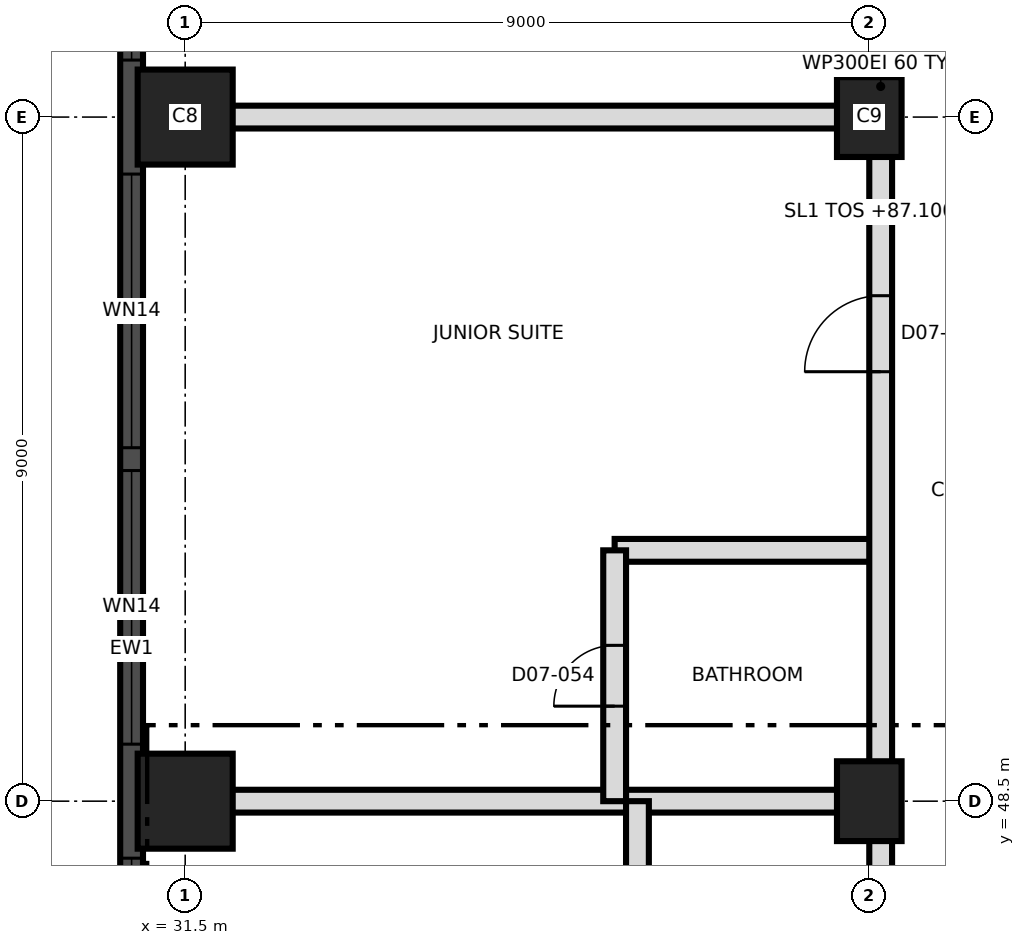
"""IFC4 building model, lengths in metres.
Left out: names, types, materials, properties, quantities, classifications, styles, units other than length and angle.
Written with IfcOpenShell. Run it as: python <this file> out.ifc"""

import sys

from ifc_helpers import new_model, si_unit, direction, frame, frame_2d, origin, origin_2d, place, context, subcontext, project, spatial, rectangle, extrude, element, fill, save


model = new_model("IFC4")
c1 = context("Model", 3, precision=1e-05, world=origin(), true_north=direction((0.0, 1.0)))
c2 = subcontext(c1, "Body", "Model", "MODEL_VIEW")
j1 = project(units=[si_unit("LENGTHUNIT", "METRE"), si_unit("PLANEANGLEUNIT", "RADIAN")], contexts=[c1])
p1 = place(None, origin())
s1 = spatial("IfcSite", under=j1, at=p1, CompositionType="ELEMENT")
p2 = place(p1, origin())
s2 = spatial("IfcBuilding", under=s1, at=p2, CompositionType="ELEMENT")
p3 = place(p2, frame((0.0, 0.0, 87.1)))
s3 = spatial("IfcBuildingStorey", under=s2, at=p3, CompositionType="ELEMENT", Elevation=87.1)
p4 = place(p3, frame((31.5, 48.5, 0.0), z_axis=(0.0, 0.0, 1.0), x_axis=(1.0, 0.0, 0.0)))
e1 = element("IfcColumn", 1, at=p4, inside=s3, PredefinedType="COLUMN", context=c2, shape_type="SweptSolid", body=[
    extrude(rectangle(XDim=1.25, YDim=1.25, at=origin_2d()), origin(), (0.0, 0.0, 1.0), 3.7),
])
p5 = place(p3, frame((40.5, 48.5, 0.0), z_axis=(0.0, 0.0, 1.0), x_axis=(0.0, 1.0, 0.0)))
e2 = element("IfcColumn", 2, at=p5, inside=s3, PredefinedType="COLUMN", context=c2, shape_type="SweptSolid", body=[
    extrude(rectangle(XDim=1.05, YDim=0.85, at=origin_2d()), origin(), (0.0, 0.0, 1.0), 3.7),
])
p6 = place(p3, frame((31.5, 57.5, 0.0), z_axis=(0.0, 0.0, 1.0), x_axis=(1.0, 0.0, 0.0)))
e3 = element("IfcColumn", 3, at=p6, inside=s3, PredefinedType="COLUMN", context=c2, shape_type="SweptSolid", body=[
    extrude(rectangle(XDim=1.25, YDim=1.25, at=origin_2d()), origin(), (0.0, 0.0, 1.0), 3.7),
])
p7 = place(p3, frame((40.5, 57.5, 0.0), z_axis=(0.0, 0.0, 1.0), x_axis=(0.0, 1.0, 0.0)))
e4 = element("IfcColumn", 4, at=p7, inside=s3, PredefinedType="COLUMN", context=c2, shape_type="SweptSolid", body=[
    extrude(rectangle(XDim=1.05, YDim=0.85, at=origin_2d()), origin(), (0.0, 0.0, 1.0), 3.7),
])
p8 = place(p3, frame((30.795, 66.992, 0.0), z_axis=(0.0, 0.0, 1.0), x_axis=(0.0, -1.0, 0.0)))
e5 = element("IfcWall", 5, at=p8, inside=s3, PredefinedType="SOLIDWALL", context=c2, shape_type="SweptSolid", body=[
    extrude(rectangle(XDim=32.981, YDim=0.3, at=frame_2d((16.491, 0.0))), origin(), (0.0, 0.0, 1.0), 3.4),
])
p9 = place(p8, frame((1.596, 0.0, 0.3)))
e6 = element("IfcOpeningElement", 6, at=p9, cuts=e5, PredefinedType="OPENING", context=c2, shape_type="SweptSolid", body=[
    extrude(rectangle(XDim=1.8, YDim=2.4, at=frame_2d((0.9, 1.2))), frame((0.0, 0.16, 0.0), z_axis=(0.0, -1.0, 0.0), x_axis=(1.0, 0.0, 0.0)), (0.0, 0.0, 1.0), 0.32),
])
p10 = place(p8, frame((5.142, 0.0, 0.9)))
e7 = element("IfcOpeningElement", 7, at=p10, cuts=e5, PredefinedType="OPENING", context=c2, shape_type="SweptSolid", body=[
    extrude(rectangle(XDim=3.6, YDim=1.7, at=frame_2d((1.8, 0.85))), frame((0.0, 0.16, 0.0), z_axis=(0.0, -1.0, 0.0), x_axis=(1.0, 0.0, 0.0)), (0.0, 0.0, 1.0), 0.32),
])
p11 = place(p8, frame((10.242, 0.0, 0.9)))
e8 = element("IfcOpeningElement", 8, at=p11, cuts=e5, PredefinedType="OPENING", context=c2, shape_type="SweptSolid", body=[
    extrude(rectangle(XDim=3.6, YDim=1.7, at=frame_2d((1.8, 0.85))), frame((0.0, 0.16, 0.0), z_axis=(0.0, -1.0, 0.0), x_axis=(1.0, 0.0, 0.0)), (0.0, 0.0, 1.0), 0.32),
])
p12 = place(p8, frame((14.142, 0.0, 0.9)))
e9 = element("IfcOpeningElement", 9, at=p12, cuts=e5, PredefinedType="OPENING", context=c2, shape_type="SweptSolid", body=[
    extrude(rectangle(XDim=3.6, YDim=1.7, at=frame_2d((1.8, 0.85))), frame((0.0, 0.16, 0.0), z_axis=(0.0, -1.0, 0.0), x_axis=(1.0, 0.0, 0.0)), (0.0, 0.0, 1.0), 0.32),
])
p13 = place(p8, frame((19.242, 0.0, 0.9)))
e10 = element("IfcOpeningElement", 10, at=p13, cuts=e5, PredefinedType="OPENING", context=c2, shape_type="SweptSolid", body=[
    extrude(rectangle(XDim=3.6, YDim=1.7, at=frame_2d((1.8, 0.85))), frame((0.0, 0.16, 0.0), z_axis=(0.0, -1.0, 0.0), x_axis=(1.0, 0.0, 0.0)), (0.0, 0.0, 1.0), 0.32),
])
p14 = place(p8, frame((23.142, 0.0, 0.9)))
e11 = element("IfcOpeningElement", 11, at=p14, cuts=e5, PredefinedType="OPENING", context=c2, shape_type="SweptSolid", body=[
    extrude(rectangle(XDim=4.2, YDim=1.7, at=frame_2d((2.1, 0.85))), frame((0.0, 0.16, 0.0), z_axis=(0.0, -1.0, 0.0), x_axis=(1.0, 0.0, 0.0)), (0.0, 0.0, 1.0), 0.32),
])
p15 = place(p8, frame((29.337, 0.0, 0.3)))
e12 = element("IfcOpeningElement", 12, at=p15, cuts=e5, PredefinedType="OPENING", context=c2, shape_type="SweptSolid", body=[
    extrude(rectangle(XDim=1.8, YDim=2.4, at=frame_2d((0.9, 1.2))), frame((0.0, 0.16, 0.0), z_axis=(0.0, -1.0, 0.0), x_axis=(1.0, 0.0, 0.0)), (0.0, 0.0, 1.0), 0.32),
])
p16 = place(p3, frame((30.995, 48.5, 0.0), z_axis=(0.0, 0.0, 1.0), x_axis=(1.0, 0.0, 0.0)))
e13 = element("IfcWall", 13, at=p16, inside=s3, PredefinedType="PARTITIONING", context=c2, shape_type="SweptSolid", body=[
    extrude(rectangle(XDim=9.655, YDim=0.3, at=frame_2d((4.827, 0.0))), origin(), (0.0, 0.0, 1.0), 3.4),
])
p17 = place(p3, frame((37.15, 51.8, 0.0), z_axis=(0.0, 0.0, 1.0), x_axis=(1.0, 0.0, 0.0)))
e14 = element("IfcWall", 14, at=p17, inside=s3, PredefinedType="PARTITIONING", context=c2, shape_type="SweptSolid", body=[
    extrude(rectangle(XDim=3.5, YDim=0.3, at=frame_2d((1.75, 0.0))), origin(), (0.0, 0.0, 1.0), 3.4),
])
p18 = place(p3, frame((30.995, 57.5, 0.0), z_axis=(0.0, 0.0, 1.0), x_axis=(1.0, 0.0, 0.0)))
e15 = element("IfcWall", 15, at=p18, inside=s3, PredefinedType="PARTITIONING", context=c2, shape_type="SweptSolid", body=[
    extrude(rectangle(XDim=9.655, YDim=0.3, at=frame_2d((4.827, 0.0))), origin(), (0.0, 0.0, 1.0), 3.4),
])
p19 = place(p3, frame((37.15, 48.5, 0.0), z_axis=(0.0, 0.0, 1.0), x_axis=(0.0, 1.0, 0.0)))
e16 = element("IfcWall", 16, at=p19, inside=s3, PredefinedType="PARTITIONING", context=c2, shape_type="SweptSolid", body=[
    extrude(rectangle(XDim=3.3, YDim=0.3, at=frame_2d((1.65, 0.0))), origin(), (0.0, 0.0, 1.0), 3.4),
])
p20 = place(p19, frame((1.25, 0.0, 0.0)))
e17 = element("IfcOpeningElement", 17, at=p20, cuts=e16, PredefinedType="OPENING", context=c2, shape_type="SweptSolid", body=[
    extrude(rectangle(XDim=0.8, YDim=2.1, at=frame_2d((0.4, 1.05))), frame((0.0, 0.16, 0.0), z_axis=(0.0, -1.0, 0.0), x_axis=(1.0, 0.0, 0.0)), (0.0, 0.0, 1.0), 0.32),
])
p21 = place(p3, frame((37.45, 45.8, 0.0), z_axis=(0.0, 0.0, 1.0), x_axis=(0.0, 1.0, 0.0)))
e18 = element("IfcWall", 18, at=p21, inside=s3, PredefinedType="PARTITIONING", context=c2, shape_type="SweptSolid", body=[
    extrude(rectangle(XDim=2.7, YDim=0.3, at=frame_2d((1.35, 0.0))), origin(), (0.0, 0.0, 1.0), 3.4),
])
p22 = place(p21, frame((0.95, 0.0, 0.0)))
e19 = element("IfcOpeningElement", 19, at=p22, cuts=e18, PredefinedType="OPENING", context=c2, shape_type="SweptSolid", body=[
    extrude(rectangle(XDim=0.8, YDim=2.1, at=frame_2d((0.4, 1.05))), frame((0.0, 0.16, 0.0), z_axis=(0.0, -1.0, 0.0), x_axis=(1.0, 0.0, 0.0)), (0.0, 0.0, 1.0), 0.32),
])
p23 = place(p3, frame((40.65, 39.8, 0.0), z_axis=(0.0, 0.0, 1.0), x_axis=(0.0, 1.0, 0.0)))
e20 = element("IfcWall", 20, at=p23, inside=s3, PredefinedType="PARTITIONING", context=c2, shape_type="SweptSolid", body=[
    extrude(rectangle(XDim=36.205, YDim=0.3, at=frame_2d((18.103, 0.0))), origin(), (0.0, 0.0, 1.0), 3.4),
])
p24 = place(p23, frame((0.835, 0.0, 0.0)))
e21 = element("IfcOpeningElement", 21, at=p24, cuts=e20, PredefinedType="OPENING", context=c2, shape_type="SweptSolid", body=[
    extrude(rectangle(XDim=1.2, YDim=2.1, at=frame_2d((0.6, 1.05))), frame((0.0, 0.16, 0.0), z_axis=(0.0, -1.0, 0.0), x_axis=(1.0, 0.0, 0.0)), (0.0, 0.0, 1.0), 0.32),
])
p25 = place(p23, frame((4.085, 0.0, 0.0)))
e22 = element("IfcOpeningElement", 22, at=p25, cuts=e20, PredefinedType="OPENING", context=c2, shape_type="SweptSolid", body=[
    extrude(rectangle(XDim=1.0, YDim=2.1, at=frame_2d((0.5, 1.05))), frame((0.0, 0.16, 0.0), z_axis=(0.0, -1.0, 0.0), x_axis=(1.0, 0.0, 0.0)), (0.0, 0.0, 1.0), 0.32),
])
p26 = place(p23, frame((14.35, 0.0, 0.0)))
e23 = element("IfcOpeningElement", 23, at=p26, cuts=e20, PredefinedType="OPENING", context=c2, shape_type="SweptSolid", body=[
    extrude(rectangle(XDim=1.0, YDim=2.4, at=frame_2d((0.5, 1.2))), frame((0.0, 0.16, 0.0), z_axis=(0.0, -1.0, 0.0), x_axis=(1.0, 0.0, 0.0)), (0.0, 0.0, 1.0), 0.32),
])
p27 = place(p23, frame((21.2, 0.0, 0.0)))
e24 = element("IfcOpeningElement", 24, at=p27, cuts=e20, PredefinedType="OPENING", context=c2, shape_type="SweptSolid", body=[
    extrude(rectangle(XDim=1.0, YDim=2.4, at=frame_2d((0.5, 1.2))), frame((0.0, 0.16, 0.0), z_axis=(0.0, -1.0, 0.0), x_axis=(1.0, 0.0, 0.0)), (0.0, 0.0, 1.0), 0.32),
])
p28 = place(p10, origin())
e25 = element("IfcWindow", 25, at=p28, inside=s3, PartitioningType="SINGLE_PANEL", PredefinedType="WINDOW", context=c2, shape_type="SweptSolid", body=[
    extrude(rectangle(XDim=3.6, YDim=1.7, at=frame_2d((1.8, 0.85))), frame((0.0, 0.03, 0.0), z_axis=(0.0, -1.0, 0.0), x_axis=(1.0, 0.0, 0.0)), (0.0, 0.0, 1.0), 0.06),
])
fill(e7, e25)
p29 = place(p11, origin())
e26 = element("IfcWindow", 26, at=p29, inside=s3, PartitioningType="SINGLE_PANEL", PredefinedType="WINDOW", context=c2, shape_type="SweptSolid", body=[
    extrude(rectangle(XDim=3.6, YDim=1.7, at=frame_2d((1.8, 0.85))), frame((0.0, 0.03, 0.0), z_axis=(0.0, -1.0, 0.0), x_axis=(1.0, 0.0, 0.0)), (0.0, 0.0, 1.0), 0.06),
])
fill(e8, e26)
p30 = place(p12, origin())
e27 = element("IfcWindow", 27, at=p30, inside=s3, PartitioningType="SINGLE_PANEL", PredefinedType="WINDOW", context=c2, shape_type="SweptSolid", body=[
    extrude(rectangle(XDim=3.6, YDim=1.7, at=frame_2d((1.8, 0.85))), frame((0.0, 0.03, 0.0), z_axis=(0.0, -1.0, 0.0), x_axis=(1.0, 0.0, 0.0)), (0.0, 0.0, 1.0), 0.06),
])
fill(e9, e27)
p31 = place(p13, origin())
e28 = element("IfcWindow", 28, at=p31, inside=s3, PartitioningType="SINGLE_PANEL", PredefinedType="WINDOW", context=c2, shape_type="SweptSolid", body=[
    extrude(rectangle(XDim=3.6, YDim=1.7, at=frame_2d((1.8, 0.85))), frame((0.0, 0.03, 0.0), z_axis=(0.0, -1.0, 0.0), x_axis=(1.0, 0.0, 0.0)), (0.0, 0.0, 1.0), 0.06),
])
fill(e10, e28)
p32 = place(p20, origin())
e29 = element("IfcDoor", 29, at=p32, inside=s3, OperationType="SINGLE_SWING_RIGHT", PredefinedType="DOOR", context=c2, shape_type="SweptSolid", body=[
    extrude(rectangle(XDim=0.8, YDim=2.1, at=frame_2d((0.4, 1.05))), frame((0.0, 0.025, 0.0), z_axis=(0.0, -1.0, 0.0), x_axis=(1.0, 0.0, 0.0)), (0.0, 0.0, 1.0), 0.05),
])
fill(e17, e29)
p33 = place(p26, origin())
e30 = element("IfcDoor", 30, at=p33, inside=s3, OperationType="SINGLE_SWING_LEFT", PredefinedType="DOOR", context=c2, shape_type="SweptSolid", body=[
    extrude(rectangle(XDim=1.0, YDim=2.4, at=frame_2d((0.5, 1.2))), frame((0.0, 0.025, 0.0), z_axis=(0.0, -1.0, 0.0), x_axis=(1.0, 0.0, 0.0)), (0.0, 0.0, 1.0), 0.05),
])
fill(e23, e30)
save(model, sys.argv[1])
